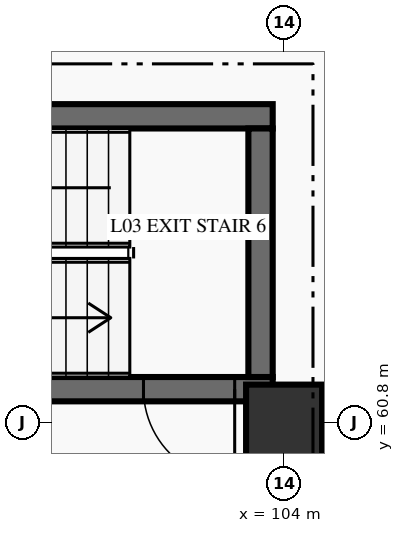
"""IFC4 building model, lengths in metres.
Left out: names, types, materials, properties, quantities, classifications, styles, units other than length and angle.
Written with IfcOpenShell. Run it as: python <this file> out.ifc"""

import sys

from ifc_helpers import new_model, si_unit, direction, frame, frame_2d, origin, origin_2d, place, context, subcontext, project, spatial, rectangle, extrude, element, fill, save


model = new_model("IFC4")
c1 = context("Model", 3, precision=1e-05, world=origin(), true_north=direction((0.0, 1.0)))
c2 = subcontext(c1, "Body", "Model", "MODEL_VIEW")
j1 = project(units=[si_unit("LENGTHUNIT", "METRE"), si_unit("PLANEANGLEUNIT", "RADIAN")], contexts=[c1])
p1 = place(None, origin())
s1 = spatial("IfcSite", under=j1, at=p1, CompositionType="ELEMENT")
p2 = place(p1, origin())
s2 = spatial("IfcBuilding", under=s1, at=p2, CompositionType="ELEMENT")
p3 = place(p2, frame((0.0, 0.0, 10.2)))
s3 = spatial("IfcBuildingStorey", under=s2, at=p3, CompositionType="ELEMENT", Elevation=10.2)
p4 = place(p3, frame((104.0, 60.8, 0.0), z_axis=(0.0, 0.0, 1.0), x_axis=(1.0, 0.0, 0.0)))
e1 = element("IfcColumn", 1, at=p4, inside=s3, PredefinedType="COLUMN", context=c2, shape_type="SweptSolid", body=[
    extrude(rectangle(XDim=1.0, YDim=1.0, at=origin_2d()), origin(), (0.0, 0.0, 1.0), 4.5),
])
p5 = place(p3, frame((103.85, 61.24, 0.0), z_axis=(0.0, 0.0, 1.0), x_axis=(-1.0, 0.0, 0.0)))
e2 = element("IfcWall", 2, at=p5, inside=s3, PredefinedType="SHEAR", context=c2, shape_type="SweptSolid", body=[
    extrude(rectangle(XDim=7.7, YDim=0.32, at=frame_2d((3.85, 0.0))), origin(), (0.0, 0.0, 1.0), 4.5),
])
p6 = place(p5, frame((0.5, 0.0, 0.0)))
e3 = element("IfcOpeningElement", 3, at=p6, cuts=e2, PredefinedType="OPENING", context=c2, shape_type="SweptSolid", body=[
    extrude(rectangle(XDim=1.2, YDim=2.2, at=frame_2d((0.6, 1.1))), frame((0.0, 0.17, 0.0), z_axis=(0.0, -1.0, 0.0), x_axis=(1.0, 0.0, 0.0)), (0.0, 0.0, 1.0), 0.34),
])
p7 = place(p3, frame((96.15, 64.83, 0.0), z_axis=(0.0, 0.0, 1.0), x_axis=(1.0, 0.0, 0.0)))
e4 = element("IfcWall", 4, at=p7, inside=s3, PredefinedType="SHEAR", context=c2, shape_type="SweptSolid", body=[
    extrude(rectangle(XDim=7.7, YDim=0.32, at=frame_2d((3.85, 0.0))), origin(), (0.0, 0.0, 1.0), 4.5),
])
p8 = place(p3, frame((103.69, 64.67, 0.0), z_axis=(0.0, 0.0, 1.0), x_axis=(0.0, -1.0, 0.0)))
e5 = element("IfcWall", 5, at=p8, inside=s3, PredefinedType="SHEAR", context=c2, shape_type="SweptSolid", body=[
    extrude(rectangle(XDim=3.27, YDim=0.32, at=frame_2d((1.635, 0.0))), origin(), (0.0, 0.0, 1.0), 4.5),
])
p9 = place(p6, origin())
e6 = element("IfcDoor", 6, at=p9, inside=s3, OperationType="SINGLE_SWING_LEFT", PredefinedType="DOOR", context=c2, shape_type="SweptSolid", body=[
    extrude(rectangle(XDim=1.2, YDim=2.2, at=frame_2d((0.6, 1.1))), frame((0.0, 0.025, 0.0), z_axis=(0.0, -1.0, 0.0), x_axis=(1.0, 0.0, 0.0)), (0.0, 0.0, 1.0), 0.05),
])
fill(e3, e6)
save(model, sys.argv[1])
